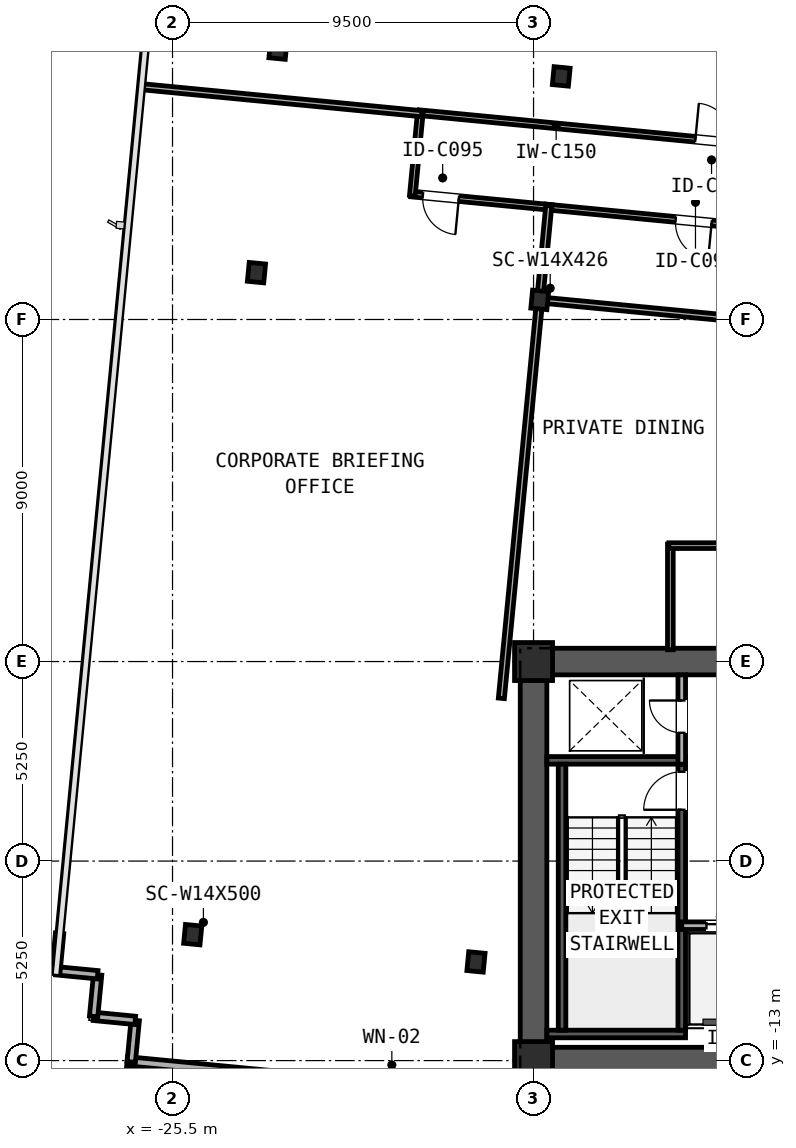
"""IFC4 building model, lengths in metres.
Left out: names, types, materials, properties, quantities, classifications, styles, units other than length and angle.
Written with IfcOpenShell. Run it as: python <this file> out.ifc"""

import sys

from ifc_helpers import new_model, si_unit, direction, frame, frame_2d, origin, origin_2d, place, context, subcontext, project, spatial, rectangle, i_section, extrude, element, fill, save


model = new_model("IFC4")
c1 = context("Model", 3, precision=1e-05, world=origin(), true_north=direction((0.0, 1.0)))
c2 = subcontext(c1, "Body", "Model", "MODEL_VIEW")
j1 = project(units=[si_unit("LENGTHUNIT", "METRE"), si_unit("PLANEANGLEUNIT", "RADIAN")], contexts=[c1])
p1 = place(None, origin())
s1 = spatial("IfcSite", under=j1, at=p1, CompositionType="ELEMENT")
p2 = place(p1, origin())
s2 = spatial("IfcBuilding", under=s1, at=p2, CompositionType="ELEMENT")
p3 = place(p2, frame((0.0, 0.0, 163.5)))
s3 = spatial("IfcBuildingStorey", under=s2, at=p3, CompositionType="ELEMENT", Elevation=163.5)
p4 = place(p3, frame((-16.35, -13.0, 0.0), z_axis=(0.0, 0.0, 1.0), x_axis=(1.0, 0.0, 0.0)))
e1 = element("IfcWall", 1, at=p4, inside=s3, PredefinedType="SHEAR", context=c2, shape_type="SweptSolid", body=[
    extrude(rectangle(XDim=32.7, YDim=0.7, at=frame_2d((16.35, 0.0))), origin(), (0.0, 0.0, 1.0), 2.91),
])
p5 = place(p3, frame((-16.35, -2.5, 0.0), z_axis=(0.0, 0.0, 1.0), x_axis=(1.0, 0.0, 0.0)))
e2 = element("IfcWall", 2, at=p5, inside=s3, PredefinedType="SHEAR", context=c2, shape_type="SweptSolid", body=[
    extrude(rectangle(XDim=32.7, YDim=0.7, at=frame_2d((16.35, 0.0))), origin(), (0.0, 0.0, 1.0), 2.91),
])
p6 = place(p5, frame((5.975, 0.0, 0.0)))
e3 = element("IfcOpeningElement", 3, at=p6, cuts=e2, PredefinedType="OPENING", context=c2, shape_type="SweptSolid", body=[
    extrude(rectangle(XDim=1.15, YDim=2.0, at=frame_2d((0.575, 1.0))), frame((0.0, 0.36, 0.0), z_axis=(0.0, -1.0, 0.0), x_axis=(1.0, 0.0, 0.0)), (0.0, 0.0, 1.0), 0.72),
])
p7 = place(p5, frame((15.55, 0.0, 0.0)))
e4 = element("IfcOpeningElement", 4, at=p7, cuts=e2, PredefinedType="OPENING", context=c2, shape_type="SweptSolid", body=[
    extrude(rectangle(XDim=1.6, YDim=2.0, at=frame_2d((0.8, 1.0))), frame((0.0, 0.36, 0.0), z_axis=(0.0, -1.0, 0.0), x_axis=(1.0, 0.0, 0.0)), (0.0, 0.0, 1.0), 0.72),
])
p8 = place(p5, frame((25.575, 0.0, 0.0)))
e5 = element("IfcOpeningElement", 5, at=p8, cuts=e2, PredefinedType="OPENING", context=c2, shape_type="SweptSolid", body=[
    extrude(rectangle(XDim=1.15, YDim=2.0, at=frame_2d((0.575, 1.0))), frame((0.0, 0.36, 0.0), z_axis=(0.0, -1.0, 0.0), x_axis=(1.0, 0.0, 0.0)), (0.0, 0.0, 1.0), 0.72),
])
p9 = place(p3, frame((-16.0, -12.65, 0.0), z_axis=(0.0, 0.0, 1.0), x_axis=(0.0, 1.0, 0.0)))
e6 = element("IfcWall", 6, at=p9, inside=s3, PredefinedType="SHEAR", context=c2, shape_type="SweptSolid", body=[
    extrude(rectangle(XDim=9.8, YDim=0.7, at=frame_2d((4.9, 0.0))), origin(), (0.0, 0.0, 1.0), 2.91),
])
for number, where, z_axis, x_axis in (
    (7, (-15.65, -12.3, 0.0), (0.0, 0.0, 1.0), (1.0, 0.0, 0.0)),
    (8, (-15.65, -5.1, 0.0), (0.0, 0.0, 1.0), (1.0, 0.0, 0.0)),
):
    element("IfcWall", number, at=place(p3, frame(where, z_axis=z_axis, x_axis=x_axis)), inside=s3, PredefinedType="SOLIDWALL", context=c2, shape_type="SweptSolid", body=[
        extrude(rectangle(XDim=3.65, YDim=0.2, at=frame_2d((1.825, 0.0))), origin(), (0.0, 0.0, 1.0), 3.19),
    ])
p10 = place(p3, frame((-15.25, -12.2, 0.0), z_axis=(0.0, 0.0, 1.0), x_axis=(0.0, 1.0, 0.0)))
e9 = element("IfcWall", 9, at=p10, inside=s3, PredefinedType="SOLIDWALL", context=c2, shape_type="SweptSolid", body=[
    extrude(rectangle(XDim=7.0, YDim=0.2, at=frame_2d((3.5, 0.0))), origin(), (0.0, 0.0, 1.0), 3.19),
])
p11 = place(p3, frame((-12.1, -12.2, 0.0), z_axis=(0.0, 0.0, 1.0), x_axis=(0.0, 1.0, 0.0)))
e10 = element("IfcWall", 10, at=p11, inside=s3, PredefinedType="SOLIDWALL", context=c2, shape_type="SweptSolid", body=[
    extrude(rectangle(XDim=7.0, YDim=0.2, at=frame_2d((3.5, 0.0))), origin(), (0.0, 0.0, 1.0), 3.19),
])
p12 = place(p11, frame((5.8, 0.0, 0.0)))
e11 = element("IfcOpeningElement", 11, at=p12, cuts=e10, PredefinedType="OPENING", context=c2, shape_type="SweptSolid", body=[
    extrude(rectangle(XDim=1.0, YDim=2.1, at=frame_2d((0.5, 1.05))), frame((0.0, 0.11, 0.0), z_axis=(0.0, -1.0, 0.0), x_axis=(1.0, 0.0, 0.0)), (0.0, 0.0, 1.0), 0.22),
])
for number, where, z_axis, x_axis in (
    (12, (-16.0, -13.0, 0.0), (0.0, 0.0, 1.0), (1.0, 0.0, 0.0)),
    (13, (-16.0, -2.5, 0.0), (0.0, 0.0, 1.0), (1.0, 0.0, 0.0)),
):
    element("IfcColumn", number, at=place(p3, frame(where, z_axis=z_axis, x_axis=x_axis)), inside=s3, PredefinedType="COLUMN", context=c2, shape_type="SweptSolid", body=[
        extrude(rectangle(XDim=1.0, YDim=1.0, at=origin_2d()), origin(), (0.0, 0.0, 1.0), 3.45),
    ])
for number, where, z_axis, x_axis in (
    (14, (-24.968, -9.686, 0.0), (0.0, 0.0, 1.0), (0.995, -0.096, 0.0)),
    (15, (-23.291, 7.733, 0.0), (0.0, 0.0, 1.0), (0.995, -0.096, 0.0)),
    (16, (-22.725, 13.614, 0.0), (0.0, 0.0, 1.0), (0.995, -0.096, 0.0)),
    (17, (-17.515, -10.404, 0.0), (0.0, 0.0, 1.0), (0.995, -0.096, 0.0)),
):
    element("IfcColumn", number, at=place(p3, frame(where, z_axis=z_axis, x_axis=x_axis)), inside=s3, PredefinedType="COLUMN", context=c2, shape_type="SweptSolid", body=[
        extrude(i_section(OverallWidth=0.432, OverallDepth=0.498, WebThickness=0.056, FlangeThickness=0.089, FilletRadius=0.031, at=origin_2d()), origin(), (0.0, 0.0, 1.0), 3.45),
    ])
for number, where, z_axis, x_axis in (
    (18, (-15.837, 7.015, 0.0), (0.0, 0.0, 1.0), (0.995, -0.096, 0.0)),
    (19, (-15.271, 12.896, 0.0), (0.0, 0.0, 1.0), (0.995, -0.096, 0.0)),
):
    element("IfcColumn", number, at=place(p3, frame(where, z_axis=z_axis, x_axis=x_axis)), inside=s3, PredefinedType="COLUMN", context=c2, shape_type="SweptSolid", body=[
        extrude(i_section(OverallWidth=0.424, OverallDepth=0.474, WebThickness=0.048, FlangeThickness=0.077, FilletRadius=0.031, at=origin_2d()), origin(), (0.0, 0.0, 1.0), 3.45),
    ])
p13 = place(p3, frame((-26.695, -13.016, 0.0), z_axis=(0.0, 0.0, 1.0), x_axis=(0.995396268366, -0.095845025554, 0.0)))
e20 = element("IfcWall", 20, at=p13, inside=s3, PredefinedType="STANDARD", context=c2, shape_type="SweptSolid", body=[
    extrude(rectangle(XDim=49.6, YDim=0.24, at=frame_2d((24.8, 0.0))), origin(), (0.0, 0.0, 1.0), 3.19),
])
p14 = place(p13, frame((6.044, 0.0, 0.7)))
e21 = element("IfcOpeningElement", 21, at=p14, cuts=e20, PredefinedType="OPENING", context=c2, shape_type="SweptSolid", body=[
    extrude(rectangle(XDim=1.8, YDim=1.5, at=frame_2d((0.9, 0.75))), frame((0.0, 0.13, 0.0), z_axis=(0.0, -1.0, 0.0), x_axis=(1.0, 0.0, 0.0)), (0.0, 0.0, 1.0), 0.26),
])
p15 = place(p13, frame((41.756, 0.0, 0.7)))
e22 = element("IfcOpeningElement", 22, at=p15, cuts=e20, PredefinedType="OPENING", context=c2, shape_type="SweptSolid", body=[
    extrude(rectangle(XDim=1.8, YDim=1.5, at=frame_2d((0.9, 0.75))), frame((0.0, 0.13, 0.0), z_axis=(0.0, -1.0, 0.0), x_axis=(1.0, 0.0, 0.0)), (0.0, 0.0, 1.0), 0.26),
])
for number, where, z_axis, x_axis in (
    (23, (-26.587, -13.037, 0.0), (0.0, 0.0, 1.0), (0.096, 0.995, 0.0)),
    (24, (-26.481, -11.942, 0.0), (0.0, 0.0, 1.0), (-0.995, 0.096, 0.0)),
    (25, (-27.576, -11.836, 0.0), (0.0, 0.0, 1.0), (0.096, 0.995, 0.0)),
    (26, (-27.471, -10.741, 0.0), (0.0, 0.0, 1.0), (-0.995, 0.096, 0.0)),
):
    element("IfcWall", number, at=place(p3, frame(where, z_axis=z_axis, x_axis=x_axis)), inside=s3, PredefinedType="STANDARD", context=c2, shape_type="SweptSolid", body=[
        extrude(rectangle(XDim=1.1, YDim=0.22, at=frame_2d((0.55, 0.0))), origin(), (0.0, 0.0, 1.0), 3.19),
    ])
p16 = place(p3, frame((-28.566, -10.636, 0.0), z_axis=(0.0, 0.0, 1.0), x_axis=(0.095914428506, 0.995389583231, 0.0)))
e27 = element("IfcWall", 27, at=p16, inside=s3, PredefinedType="STANDARD", context=c2, shape_type="SweptSolid", body=[
    extrude(rectangle(XDim=0.99, YDim=0.22, at=frame_2d((0.495, 0.0))), origin(), (0.0, 0.0, 1.0), 3.19),
])
p17 = place(p3, frame((-12.1, -5.2, 0.0), z_axis=(0.0, 0.0, 1.0), x_axis=(0.0, 1.0, 0.0)))
e28 = element("IfcWall", 28, at=p17, inside=s3, PredefinedType="PARTITIONING", context=c2, shape_type="SweptSolid", body=[
    extrude(rectangle(XDim=2.35, YDim=0.2, at=frame_2d((1.175, 0.0))), origin(), (0.0, 0.0, 1.0), 2.225),
])
p18 = place(p17, frame((0.825, 0.0, 0.0)))
e29 = element("IfcOpeningElement", 29, at=p18, cuts=e28, PredefinedType="OPENING", context=c2, shape_type="SweptSolid", body=[
    extrude(rectangle(XDim=0.85, YDim=2.05, at=frame_2d((0.425, 1.025))), frame((0.0, 0.11, 0.0), z_axis=(0.0, -1.0, 0.0), x_axis=(1.0, 0.0, 0.0)), (0.0, 0.0, 1.0), 0.22),
])
p19 = place(p3, frame((-12.1, -9.45, 0.0), z_axis=(0.0, 0.0, 1.0), x_axis=(1.0, 0.0, 0.0)))
e30 = element("IfcWall", 30, at=p19, inside=s3, PredefinedType="PARTITIONING", context=c2, shape_type="SweptSolid", body=[
    extrude(rectangle(XDim=4.7, YDim=0.2, at=frame_2d((2.35, 0.0))), origin(), (0.0, 0.0, 1.0), 3.19),
])
p20 = place(p19, frame((0.65, 0.0, 0.0)))
e31 = element("IfcOpeningElement", 31, at=p20, cuts=e30, PredefinedType="OPENING", context=c2, shape_type="SweptSolid", body=[
    extrude(rectangle(XDim=1.1, YDim=2.2, at=frame_2d((0.55, 1.1))), frame((0.0, 0.11, 0.0), z_axis=(0.0, -1.0, 0.0), x_axis=(1.0, 0.0, 0.0)), (0.0, 0.0, 1.0), 0.22),
])
p21 = place(p19, frame((2.95, 0.0, 0.0)))
e32 = element("IfcOpeningElement", 32, at=p21, cuts=e30, PredefinedType="OPENING", context=c2, shape_type="SweptSolid", body=[
    extrude(rectangle(XDim=1.1, YDim=2.2, at=frame_2d((0.55, 1.1))), frame((0.0, 0.11, 0.0), z_axis=(0.0, -1.0, 0.0), x_axis=(1.0, 0.0, 0.0)), (0.0, 0.0, 1.0), 0.22),
])
p22 = place(p3, frame((-19.02, 11.943, 0.0), z_axis=(0.0, 0.0, 1.0), x_axis=(0.995395421372, -0.095853821582, 0.0)))
e33 = element("IfcWall", 33, at=p22, inside=s3, PredefinedType="PARTITIONING", context=c2, shape_type="SweptSolid", body=[
    extrude(rectangle(XDim=11.678, YDim=0.15, at=frame_2d((5.839, 0.0))), origin(), (0.0, 0.0, 1.0), 2.479),
])
p23 = place(p22, frame((7.312, 0.0, 0.0)))
e34 = element("IfcOpeningElement", 34, at=p23, cuts=e33, PredefinedType="OPENING", context=c2, shape_type="SweptSolid", body=[
    extrude(rectangle(XDim=0.95, YDim=2.15, at=frame_2d((0.475, 1.075))), frame((0.0, 0.085, 0.0), z_axis=(0.0, -1.0, 0.0), x_axis=(1.0, 0.0, 0.0)), (0.0, 0.0, 1.0), 0.17),
])
p24 = place(p3, frame((3.121, 7.651, 0.0), z_axis=(0.0, 0.0, 1.0), x_axis=(-0.995397135603, 0.095836018457, 0.0)))
e35 = element("IfcWall", 35, at=p24, inside=s3, PredefinedType="PARTITIONING", context=c2, shape_type="SweptSolid", body=[
    extrude(rectangle(XDim=18.892, YDim=0.15, at=frame_2d((9.446, 0.0))), origin(), (0.0, 0.0, 1.0), 2.479),
])
p25 = place(p24, frame((14.502, 0.0, 0.0)))
e36 = element("IfcOpeningElement", 36, at=p25, cuts=e35, PredefinedType="OPENING", context=c2, shape_type="SweptSolid", body=[
    extrude(rectangle(XDim=0.95, YDim=2.15, at=frame_2d((0.475, 1.075))), frame((0.0, 0.085, 0.0), z_axis=(0.0, -1.0, 0.0), x_axis=(1.0, 0.0, 0.0)), (0.0, 0.0, 1.0), 0.17),
])
p26 = place(p3, frame((-12.4, -2.19, 0.0), z_axis=(0.0, 0.0, 1.0), x_axis=(0.0, 1.0, 0.0)))
e37 = element("IfcWall", 37, at=p26, inside=s3, PredefinedType="PARTITIONING", context=c2, shape_type="SweptSolid", body=[
    extrude(rectangle(XDim=2.78, YDim=0.15, at=frame_2d((1.39, 0.0))), origin(), (0.0, 0.0, 1.0), 2.225),
])
p27 = place(p3, frame((-12.44, 0.55, 0.0), z_axis=(0.0, 0.0, 1.0), x_axis=(1.0, 0.0, 0.0)))
e38 = element("IfcWall", 38, at=p27, inside=s3, PredefinedType="PARTITIONING", context=c2, shape_type="SweptSolid", body=[
    extrude(rectangle(XDim=14.877, YDim=0.15, at=frame_2d((7.438, 0.0))), origin(), (0.0, 0.0, 1.0), 2.479),
])
p28 = place(p27, frame((9.449, 0.0, 0.0)))
e39 = element("IfcOpeningElement", 39, at=p28, cuts=e38, PredefinedType="OPENING", context=c2, shape_type="SweptSolid", body=[
    extrude(rectangle(XDim=0.95, YDim=2.15, at=frame_2d((0.475, 1.075))), frame((0.0, 0.085, 0.0), z_axis=(0.0, -1.0, 0.0), x_axis=(1.0, 0.0, 0.0)), (0.0, 0.0, 1.0), 0.17),
])
p29 = place(p3, frame((-15.521, 9.446, 0.0), z_axis=(0.0, 0.0, 1.0), x_axis=(-0.995397364202, 0.095833644092, 0.0)))
e40 = element("IfcWall", 40, at=p29, inside=s3, PredefinedType="PARTITIONING", context=c2, shape_type="SweptSolid", body=[
    extrude(rectangle(XDim=3.722, YDim=0.15, at=frame_2d((1.861, 0.0))), origin(), (0.0, 0.0, 1.0), 2.479),
])
p30 = place(p29, frame((2.457, 0.0, 0.0)))
e41 = element("IfcOpeningElement", 41, at=p30, cuts=e40, PredefinedType="OPENING", context=c2, shape_type="SweptSolid", body=[
    extrude(rectangle(XDim=0.95, YDim=2.15, at=frame_2d((0.475, 1.075))), frame((0.0, 0.085, 0.0), z_axis=(0.0, -1.0, 0.0), x_axis=(1.0, 0.0, 0.0)), (0.0, 0.0, 1.0), 0.17),
])
p31 = place(p3, frame((-19.19, 9.759, 0.0), z_axis=(0.0, 0.0, 1.0), x_axis=(0.095882898123, 0.995392620953, 0.0)))
e42 = element("IfcWall", 42, at=p31, inside=s3, PredefinedType="PARTITIONING", context=c2, shape_type="SweptSolid", body=[
    extrude(rectangle(XDim=2.21, YDim=0.15, at=frame_2d((1.105, 0.0))), origin(), (0.0, 0.0, 1.0), 2.718),
])
p32 = place(p3, frame((-18.942, 11.916, 0.0), z_axis=(0.0, 0.0, 1.0), x_axis=(-0.995395927026, 0.095848570461, 0.0)))
e43 = element("IfcWall", 43, at=p32, inside=s3, PredefinedType="PARTITIONING", context=c2, shape_type="SweptSolid", body=[
    extrude(rectangle(XDim=7.448, YDim=0.16, at=frame_2d((3.724, 0.0))), origin(), (0.0, 0.0, 1.0), 2.558),
])
p33 = place(p3, frame((-8.093, 6.27, 0.0), z_axis=(0.0, 0.0, 1.0), x_axis=(-0.995396962155, 0.095837819954, 0.0)))
e44 = element("IfcWall", 44, at=p33, inside=s3, PredefinedType="PARTITIONING", context=c2, shape_type="SweptSolid", body=[
    extrude(rectangle(XDim=7.604, YDim=0.16, at=frame_2d((3.802, 0.0))), origin(), (0.0, 0.0, 1.0), 2.479),
])
p34 = place(p3, frame((-15.821, 7.191, 0.0), z_axis=(0.0, 0.0, 1.0), x_axis=(0.09580488871, 0.995400132258, 0.0)))
e45 = element("IfcWall", 45, at=p34, inside=s3, PredefinedType="PARTITIONING", context=c2, shape_type="SweptSolid", body=[
    extrude(rectangle(XDim=2.314, YDim=0.16, at=frame_2d((1.157, 0.0))), origin(), (0.0, 0.0, 1.0), 2.479),
])
p35 = place(p3, frame((-16.847, -3.468, 0.0), z_axis=(0.0, 0.0, 1.0), x_axis=(0.095854804219, 0.995395326746, 0.0)))
e46 = element("IfcWall", 46, at=p35, inside=s3, PredefinedType="PARTITIONING", context=c2, shape_type="SweptSolid", body=[
    extrude(rectangle(XDim=10.356, YDim=0.16, at=frame_2d((5.178, 0.0))), origin(), (0.0, 0.0, 1.0), 2.479),
])
p36 = place(p12, frame((1.0, 0.0, 0.0), z_axis=(0.0, 0.0, 1.0), x_axis=(-1.0, 0.0, 0.0)))
e47 = element("IfcDoor", 47, at=p36, inside=s3, OperationType="SINGLE_SWING_LEFT", PredefinedType="DOOR", context=c2, shape_type="SweptSolid", body=[
    extrude(rectangle(XDim=1.0, YDim=2.1, at=frame_2d((0.5, 1.05))), frame((0.0, 0.025, 0.0), z_axis=(0.0, -1.0, 0.0), x_axis=(1.0, 0.0, 0.0)), (0.0, 0.0, 1.0), 0.05),
])
fill(e11, e47)
p37 = place(p18, origin())
e48 = element("IfcDoor", 48, at=p37, inside=s3, OperationType="SINGLE_SWING_RIGHT", PredefinedType="DOOR", context=c2, shape_type="SweptSolid", body=[
    extrude(rectangle(XDim=0.85, YDim=2.05, at=frame_2d((0.425, 1.025))), frame((0.0, 0.025, 0.0), z_axis=(0.0, -1.0, 0.0), x_axis=(1.0, 0.0, 0.0)), (0.0, 0.0, 1.0), 0.05),
])
fill(e29, e48)
p38 = place(p20, origin())
e49 = element("IfcDoor", 49, at=p38, inside=s3, OperationType="SLIDING_TO_LEFT", PredefinedType="DOOR", context=c2, shape_type="SweptSolid", body=[
    extrude(rectangle(XDim=1.1, YDim=2.2, at=frame_2d((0.55, 1.1))), frame((0.0, 0.025, 0.0), z_axis=(0.0, -1.0, 0.0), x_axis=(1.0, 0.0, 0.0)), (0.0, 0.0, 1.0), 0.05),
])
fill(e31, e49)
p39 = place(p23, frame((0.95, 0.0, 0.0), z_axis=(0.0, 0.0, 1.0), x_axis=(-1.0, 0.0, 0.0)))
e50 = element("IfcDoor", 50, at=p39, inside=s3, OperationType="SINGLE_SWING_LEFT", PredefinedType="DOOR", context=c2, shape_type="SweptSolid", body=[
    extrude(rectangle(XDim=0.95, YDim=2.15, at=frame_2d((0.475, 1.075))), frame((0.0, 0.025, 0.0), z_axis=(0.0, -1.0, 0.0), x_axis=(1.0, 0.0, 0.0)), (0.0, 0.0, 1.0), 0.05),
])
fill(e34, e50)
p40 = place(p25, frame((0.95, 0.0, 0.0), z_axis=(0.0, 0.0, 1.0), x_axis=(-1.0, 0.0, 0.0)))
e51 = element("IfcDoor", 51, at=p40, inside=s3, OperationType="SINGLE_SWING_LEFT", PredefinedType="DOOR", context=c2, shape_type="SweptSolid", body=[
    extrude(rectangle(XDim=0.95, YDim=2.15, at=frame_2d((0.475, 1.075))), frame((0.0, 0.025, 0.0), z_axis=(0.0, -1.0, 0.0), x_axis=(1.0, 0.0, 0.0)), (0.0, 0.0, 1.0), 0.05),
])
fill(e36, e51)
p41 = place(p30, frame((0.95, 0.0, 0.0), z_axis=(0.0, 0.0, 1.0), x_axis=(-1.0, 0.0, 0.0)))
e52 = element("IfcDoor", 52, at=p41, inside=s3, OperationType="SINGLE_SWING_LEFT", PredefinedType="DOOR", context=c2, shape_type="SweptSolid", body=[
    extrude(rectangle(XDim=0.95, YDim=2.15, at=frame_2d((0.475, 1.075))), frame((0.0, 0.025, 0.0), z_axis=(0.0, -1.0, 0.0), x_axis=(1.0, 0.0, 0.0)), (0.0, 0.0, 1.0), 0.05),
])
fill(e41, e52)
save(model, sys.argv[1])
